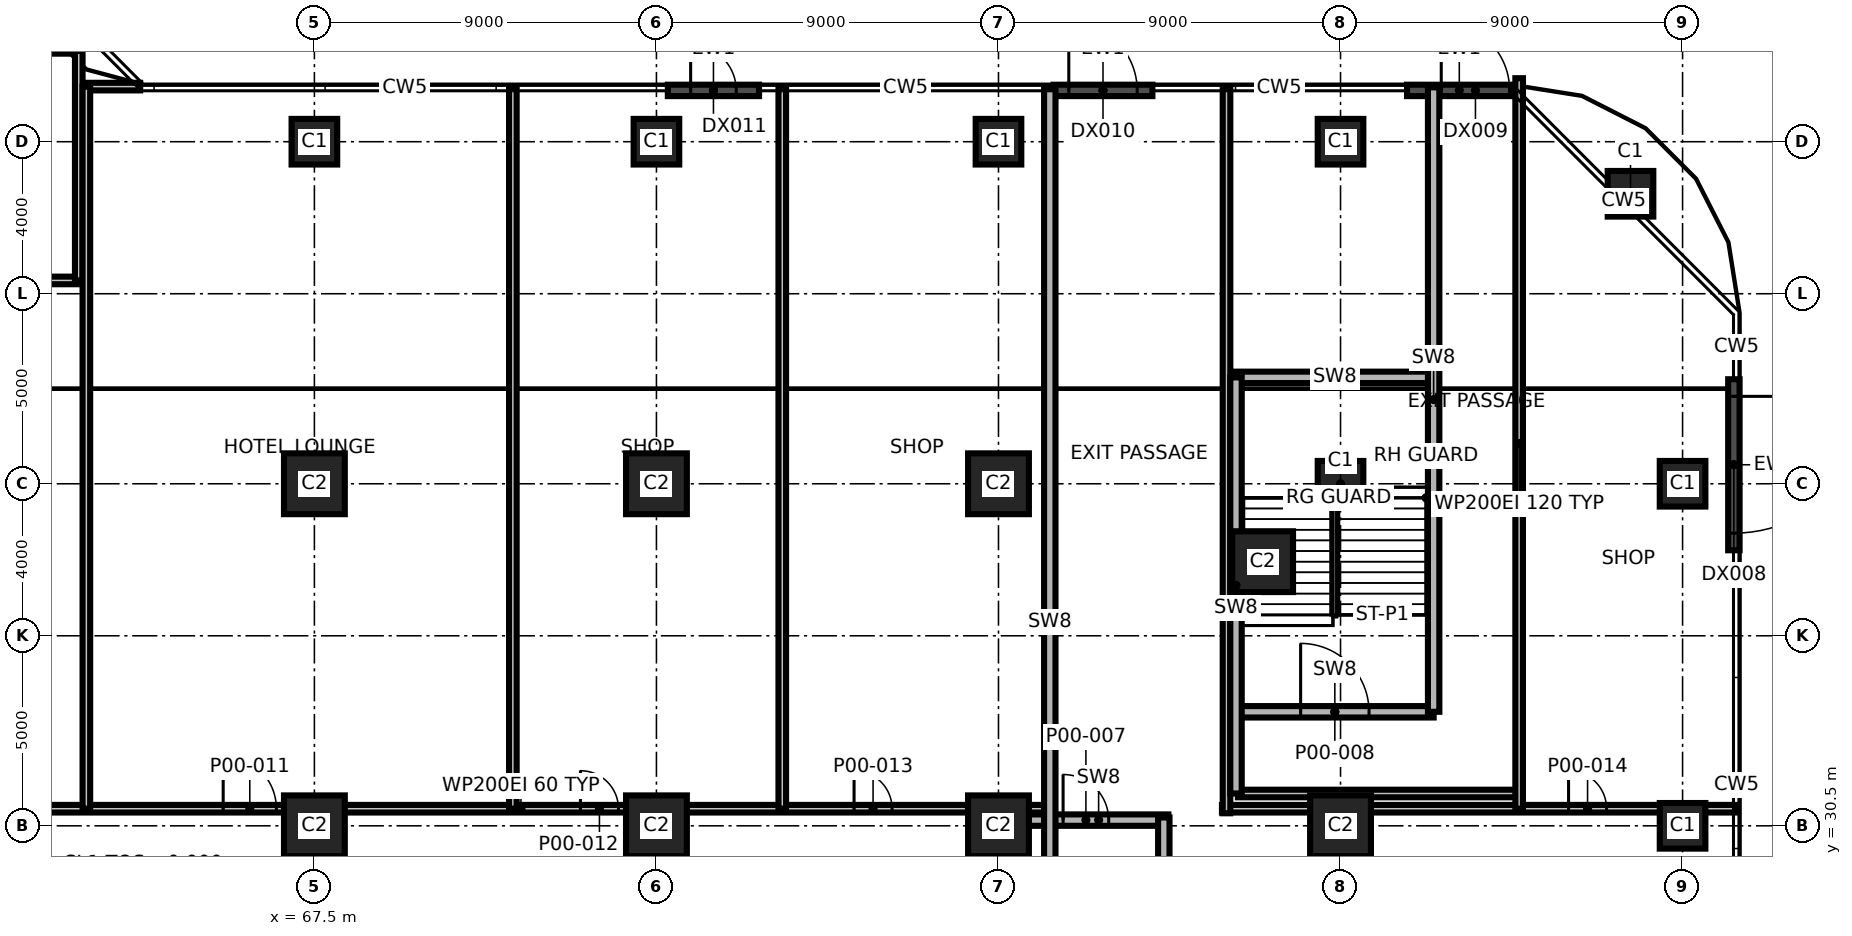
"""IFC4 building model, lengths in metres.
Left out: names, types, materials, properties, quantities, classifications, styles, units other than length and angle.
Written with IfcOpenShell. Run it as: python <this file> out.ifc"""

import sys

from ifc_helpers import new_model, si_unit, direction, frame, frame_2d, origin, origin_2d, place, context, subcontext, project, spatial, rectangle, extrude, element, fill, save


model = new_model("IFC4")
c1 = context("Model", 3, precision=1e-05, world=origin(), true_north=direction((0.0, 1.0)))
c2 = subcontext(c1, "Body", "Model", "MODEL_VIEW")
j1 = project(units=[si_unit("LENGTHUNIT", "METRE"), si_unit("PLANEANGLEUNIT", "RADIAN")], contexts=[c1])
p1 = place(None, origin())
s1 = spatial("IfcSite", under=j1, at=p1, CompositionType="ELEMENT")
p2 = place(p1, origin())
s2 = spatial("IfcBuilding", under=s1, at=p2, CompositionType="ELEMENT")
p3 = place(p2, origin())
s3 = spatial("IfcBuildingStorey", under=s2, at=p3, CompositionType="ELEMENT", Elevation=0.0)
for number, where, z_axis, x_axis in (
    (1, (67.5, 30.5, 0.0), (0.0, 0.0, 1.0), (1.0, 0.0, 0.0)),
    (2, (76.5, 30.5, 0.0), (0.0, 0.0, 1.0), (1.0, 0.0, 0.0)),
    (3, (85.5, 30.5, 0.0), (0.0, 0.0, 1.0), (1.0, 0.0, 0.0)),
    (4, (94.5, 30.5, 0.0), (0.0, 0.0, 1.0), (1.0, 0.0, 0.0)),
):
    element("IfcColumn", number, at=place(p3, frame(where, z_axis=z_axis, x_axis=x_axis)), inside=s3, PredefinedType="COLUMN", context=c2, shape_type="SweptSolid", body=[
        extrude(rectangle(XDim=1.6, YDim=1.6, at=origin_2d()), origin(), (0.0, 0.0, 1.0), 8.0),
    ])
p4 = place(p3, frame((103.5, 30.5, 0.0), z_axis=(0.0, 0.0, 1.0), x_axis=(1.0, 0.0, 0.0)))
e5 = element("IfcColumn", 5, at=p4, inside=s3, PredefinedType="COLUMN", context=c2, shape_type="SweptSolid", body=[
    extrude(rectangle(XDim=1.2, YDim=1.2, at=origin_2d()), origin(), (0.0, 0.0, 1.0), 8.0),
])
for number, where, z_axis, x_axis in (
    (6, (67.5, 39.5, 0.0), (0.0, 0.0, 1.0), (1.0, 0.0, 0.0)),
    (7, (76.5, 39.5, 0.0), (0.0, 0.0, 1.0), (1.0, 0.0, 0.0)),
    (8, (85.5, 39.5, 0.0), (0.0, 0.0, 1.0), (1.0, 0.0, 0.0)),
):
    element("IfcColumn", number, at=place(p3, frame(where, z_axis=z_axis, x_axis=x_axis)), inside=s3, PredefinedType="COLUMN", context=c2, shape_type="SweptSolid", body=[
        extrude(rectangle(XDim=1.6, YDim=1.6, at=origin_2d()), origin(), (0.0, 0.0, 1.0), 8.0),
    ])
for number, where, z_axis, x_axis in (
    (9, (94.5, 39.5, 0.0), (0.0, 0.0, 1.0), (1.0, 0.0, 0.0)),
    (10, (103.5, 39.5, 0.0), (0.0, 0.0, 1.0), (1.0, 0.0, 0.0)),
    (11, (102.13, 47.13, 0.0), (0.0, 0.0, 1.0), (1.0, 0.0, 0.0)),
    (12, (67.5, 48.5, 0.0), (0.0, 0.0, 1.0), (1.0, 0.0, 0.0)),
    (13, (76.5, 48.5, 0.0), (0.0, 0.0, 1.0), (1.0, 0.0, 0.0)),
    (14, (85.5, 48.5, 0.0), (0.0, 0.0, 1.0), (1.0, 0.0, 0.0)),
    (15, (94.5, 48.5, 0.0), (0.0, 0.0, 1.0), (1.0, 0.0, 0.0)),
):
    element("IfcColumn", number, at=place(p3, frame(where, z_axis=z_axis, x_axis=x_axis)), inside=s3, PredefinedType="COLUMN", context=c2, shape_type="SweptSolid", body=[
        extrude(rectangle(XDim=1.2, YDim=1.2, at=origin_2d()), origin(), (0.0, 0.0, 1.0), 8.0),
    ])
p5 = place(p3, frame((92.45, 37.45, 0.0), z_axis=(0.0, 0.0, 1.0), x_axis=(1.0, 0.0, 0.0)))
e16 = element("IfcColumn", 16, at=p5, inside=s3, PredefinedType="COLUMN", context=c2, shape_type="SweptSolid", body=[
    extrude(rectangle(XDim=1.6, YDim=1.6, at=origin_2d()), origin(), (0.0, 0.0, 1.0), 8.0),
])
p6 = place(p3, frame((104.85, 42.25, 0.0), z_axis=(0.0, 0.0, 1.0), x_axis=(0.0, -1.0, 0.0)))
e17 = element("IfcWall", 17, at=p6, inside=s3, PredefinedType="SOLIDWALL", context=c2, shape_type="SweptSolid", body=[
    extrude(rectangle(XDim=4.5, YDim=0.3, at=frame_2d((2.25, 0.0))), origin(), (0.0, 0.0, 1.0), 7.7),
])
p7 = place(p6, frame((0.45, 0.0, 0.0)))
e18 = element("IfcOpeningElement", 18, at=p7, cuts=e17, PredefinedType="OPENING", context=c2, shape_type="SweptSolid", body=[
    extrude(rectangle(XDim=3.6, YDim=3.0, at=frame_2d((1.8, 1.5))), frame((0.0, 0.16, 0.0), z_axis=(0.0, -1.0, 0.0), x_axis=(1.0, 0.0, 0.0)), (0.0, 0.0, 1.0), 0.32),
])
p8 = place(p3, frame((96.25, 49.85, 0.0), z_axis=(0.0, 0.0, 1.0), x_axis=(1.0, 0.0, 0.0)))
e19 = element("IfcWall", 19, at=p8, inside=s3, PredefinedType="SOLIDWALL", context=c2, shape_type="SweptSolid", body=[
    extrude(rectangle(XDim=2.75, YDim=0.3, at=frame_2d((1.375, 0.0))), origin(), (0.0, 0.0, 1.0), 7.7),
])
p9 = place(p8, frame((0.9, 0.0, 0.0)))
e20 = element("IfcOpeningElement", 20, at=p9, cuts=e19, PredefinedType="OPENING", context=c2, shape_type="SweptSolid", body=[
    extrude(rectangle(XDim=1.8, YDim=2.4, at=frame_2d((0.9, 1.2))), frame((0.0, 0.16, 0.0), z_axis=(0.0, -1.0, 0.0), x_axis=(1.0, 0.0, 0.0)), (0.0, 0.0, 1.0), 0.32),
])
p10 = place(p3, frame((86.95, 49.85, 0.0), z_axis=(0.0, 0.0, 1.0), x_axis=(1.0, 0.0, 0.0)))
e21 = element("IfcWall", 21, at=p10, inside=s3, PredefinedType="SOLIDWALL", context=c2, shape_type="SweptSolid", body=[
    extrude(rectangle(XDim=2.6, YDim=0.3, at=frame_2d((1.3, 0.0))), origin(), (0.0, 0.0, 1.0), 7.7),
])
p11 = place(p10, frame((0.4, 0.0, 0.0)))
e22 = element("IfcOpeningElement", 22, at=p11, cuts=e21, PredefinedType="OPENING", context=c2, shape_type="SweptSolid", body=[
    extrude(rectangle(XDim=1.8, YDim=2.4, at=frame_2d((0.9, 1.2))), frame((0.0, 0.16, 0.0), z_axis=(0.0, -1.0, 0.0), x_axis=(1.0, 0.0, 0.0)), (0.0, 0.0, 1.0), 0.32),
])
p12 = place(p3, frame((76.8, 49.85, 0.0), z_axis=(0.0, 0.0, 1.0), x_axis=(1.0, 0.0, 0.0)))
e23 = element("IfcWall", 23, at=p12, inside=s3, PredefinedType="SOLIDWALL", context=c2, shape_type="SweptSolid", body=[
    extrude(rectangle(XDim=2.4, YDim=0.3, at=frame_2d((1.2, 0.0))), origin(), (0.0, 0.0, 1.0), 7.7),
])
p13 = place(p12, frame((0.6, 0.0, 0.0)))
e24 = element("IfcOpeningElement", 24, at=p13, cuts=e23, PredefinedType="OPENING", context=c2, shape_type="SweptSolid", body=[
    extrude(rectangle(XDim=1.2, YDim=2.4, at=frame_2d((0.6, 1.2))), frame((0.0, 0.16, 0.0), z_axis=(0.0, -1.0, 0.0), x_axis=(1.0, 0.0, 0.0)), (0.0, 0.0, 1.0), 0.32),
])
p14 = place(p3, frame((86.3, 30.65, 0.0), z_axis=(0.0, 0.0, 1.0), x_axis=(1.0, 0.0, 0.0)))
e25 = element("IfcWall", 25, at=p14, inside=s3, PredefinedType="SHEAR", context=c2, shape_type="SweptSolid", body=[
    extrude(rectangle(XDim=3.67, YDim=0.3, at=frame_2d((1.835, 0.0))), origin(), (0.0, 0.0, 1.0), 7.7),
])
p15 = place(p14, frame((0.9, 0.0, 0.0)))
e26 = element("IfcOpeningElement", 26, at=p15, cuts=e25, PredefinedType="OPENING", context=c2, shape_type="SweptSolid", body=[
    extrude(rectangle(XDim=1.2, YDim=2.1, at=frame_2d((0.6, 1.05))), frame((0.0, 0.16, 0.0), z_axis=(0.0, -1.0, 0.0), x_axis=(1.0, 0.0, 0.0)), (0.0, 0.0, 1.0), 0.32),
])
p16 = place(p3, frame((58.97, 30.95, 0.0), z_axis=(0.0, 0.0, 1.0), x_axis=(1.0, 0.0, 0.0)))
e27 = element("IfcWall", 27, at=p16, inside=s3, PredefinedType="PARTITIONING", context=c2, shape_type="SweptSolid", body=[
    extrude(rectangle(XDim=27.93, YDim=0.2, at=frame_2d((13.965, 0.0))), origin(), (0.0, 0.0, 1.0), 7.7),
])
p17 = place(p16, frame((6.13, 0.0, 0.0)))
e28 = element("IfcOpeningElement", 28, at=p17, cuts=e27, PredefinedType="OPENING", context=c2, shape_type="SweptSolid", body=[
    extrude(rectangle(XDim=1.4, YDim=2.1, at=frame_2d((0.7, 1.05))), frame((0.0, 0.11, 0.0), z_axis=(0.0, -1.0, 0.0), x_axis=(1.0, 0.0, 0.0)), (0.0, 0.0, 1.0), 0.22),
])
p18 = place(p16, frame((15.53, 0.0, 0.0)))
e29 = element("IfcOpeningElement", 29, at=p18, cuts=e27, PredefinedType="OPENING", context=c2, shape_type="SweptSolid", body=[
    extrude(rectangle(XDim=1.0, YDim=2.1, at=frame_2d((0.5, 1.05))), frame((0.0, 0.11, 0.0), z_axis=(0.0, -1.0, 0.0), x_axis=(1.0, 0.0, 0.0)), (0.0, 0.0, 1.0), 0.22),
])
p19 = place(p16, frame((22.73, 0.0, 0.0)))
e30 = element("IfcOpeningElement", 30, at=p19, cuts=e27, PredefinedType="OPENING", context=c2, shape_type="SweptSolid", body=[
    extrude(rectangle(XDim=1.0, YDim=2.1, at=frame_2d((0.5, 1.05))), frame((0.0, 0.11, 0.0), z_axis=(0.0, -1.0, 0.0), x_axis=(1.0, 0.0, 0.0)), (0.0, 0.0, 1.0), 0.22),
])
p20 = place(p3, frame((91.38, 30.95, 0.0), z_axis=(0.0, 0.0, 1.0), x_axis=(1.0, 0.0, 0.0)))
e31 = element("IfcWall", 31, at=p20, inside=s3, PredefinedType="PARTITIONING", context=c2, shape_type="SweptSolid", body=[
    extrude(rectangle(XDim=13.55, YDim=0.2, at=frame_2d((6.775, 0.0))), origin(), (0.0, 0.0, 1.0), 6.8),
])
p21 = place(p20, frame((9.12, 0.0, 0.0)))
e32 = element("IfcOpeningElement", 32, at=p21, cuts=e31, PredefinedType="OPENING", context=c2, shape_type="SweptSolid", body=[
    extrude(rectangle(XDim=1.0, YDim=2.1, at=frame_2d((0.5, 1.05))), frame((0.0, 0.11, 0.0), z_axis=(0.0, -1.0, 0.0), x_axis=(1.0, 0.0, 0.0)), (0.0, 0.0, 1.0), 0.22),
])
p22 = place(p3, frame((91.8, 31.35, 0.0), z_axis=(0.0, 0.0, 1.0), x_axis=(1.0, 0.0, 0.0)))
e33 = element("IfcWall", 33, at=p22, inside=s3, PredefinedType="PARTITIONING", context=c2, shape_type="SweptSolid", body=[
    extrude(rectangle(XDim=7.4, YDim=0.2, at=frame_2d((3.7, 0.0))), origin(), (0.0, 0.0, 1.0), 7.7),
])
p23 = place(p3, frame((91.75, 33.5, 0.0), z_axis=(0.0, 0.0, 1.0), x_axis=(1.0, 0.0, 0.0)))
e34 = element("IfcWall", 34, at=p23, inside=s3, PredefinedType="SHEAR", context=c2, shape_type="SweptSolid", body=[
    extrude(rectangle(XDim=5.2, YDim=0.3, at=frame_2d((2.6, 0.0))), origin(), (0.0, 0.0, 1.0), 7.7),
])
p24 = place(p23, frame((1.7, 0.0, 0.0)))
e35 = element("IfcOpeningElement", 35, at=p24, cuts=e34, PredefinedType="OPENING", context=c2, shape_type="SweptSolid", body=[
    extrude(rectangle(XDim=1.8, YDim=2.1, at=frame_2d((0.9, 1.05))), frame((0.0, 0.16, 0.0), z_axis=(0.0, -1.0, 0.0), x_axis=(1.0, 0.0, 0.0)), (0.0, 0.0, 1.0), 0.32),
])
p25 = place(p3, frame((91.75, 42.3, 0.0), z_axis=(0.0, 0.0, 1.0), x_axis=(1.0, 0.0, 0.0)))
e36 = element("IfcWall", 36, at=p25, inside=s3, PredefinedType="SHEAR", context=c2, shape_type="SweptSolid", body=[
    extrude(rectangle(XDim=5.2, YDim=0.3, at=frame_2d((2.6, 0.0))), origin(), (0.0, 0.0, 1.0), 7.7),
])
p26 = place(p3, frame((43.3, 44.85, 0.0), z_axis=(0.0, 0.0, 1.0), x_axis=(1.0, 0.0, 0.0)))
e37 = element("IfcWall", 37, at=p26, inside=s3, PredefinedType="PARTITIONING", context=c2, shape_type="SweptSolid", body=[
    extrude(rectangle(XDim=18.2, YDim=0.2, at=frame_2d((9.1, 0.0))), origin(), (0.0, 0.0, 1.0), 7.7),
])
p27 = place(p26, frame((5.589, 0.0, 0.0)))
e38 = element("IfcOpeningElement", 38, at=p27, cuts=e37, PredefinedType="OPENING", context=c2, shape_type="SweptSolid", body=[
    extrude(rectangle(XDim=1.0, YDim=2.1, at=frame_2d((0.5, 1.05))), frame((0.0, 0.11, 0.0), z_axis=(0.0, -1.0, 0.0), x_axis=(1.0, 0.0, 0.0)), (0.0, 0.0, 1.0), 0.22),
])
p28 = place(p3, frame((61.5, 49.95, 0.0), z_axis=(0.0, 0.0, 1.0), x_axis=(1.0, 0.0, 0.0)))
e39 = element("IfcWall", 39, at=p28, inside=s3, PredefinedType="PARTITIONING", context=c2, shape_type="SweptSolid", body=[
    extrude(rectangle(XDim=1.416, YDim=0.2, at=frame_2d((0.708, 0.0))), origin(), (0.0, 0.0, 1.0), 6.8),
])
p29 = place(p3, frame((43.3, 50.917, 0.0), z_axis=(0.0, 0.0, 1.0), x_axis=(1.0, 0.0, 0.0)))
e40 = element("IfcWall", 40, at=p29, inside=s3, PredefinedType="PARTITIONING", context=c2, shape_type="SweptSolid", body=[
    extrude(rectangle(XDim=17.972, YDim=0.2, at=frame_2d((8.986, 0.0))), origin(), (0.0, 0.0, 1.0), 6.8),
])
p30 = place(p3, frame((61.3, 44.85, 0.0), z_axis=(0.0, 0.0, 1.0), x_axis=(0.0, 1.0, 0.0)))
e41 = element("IfcWall", 41, at=p30, inside=s3, PredefinedType="PARTITIONING", context=c2, shape_type="SweptSolid", body=[
    extrude(rectangle(XDim=6.038, YDim=0.2, at=frame_2d((3.019, 0.0))), origin(), (0.0, 0.0, 1.0), 6.8),
])
p31 = place(p3, frame((61.5, 30.95, 0.0), z_axis=(0.0, 0.0, 1.0), x_axis=(0.0, 1.0, 0.0)))
e42 = element("IfcWall", 42, at=p31, inside=s3, PredefinedType="PARTITIONING", context=c2, shape_type="SweptSolid", body=[
    extrude(rectangle(XDim=19.0, YDim=0.2, at=frame_2d((9.5, 0.0))), origin(), (0.0, 0.0, 1.0), 6.8),
])
for number, where, z_axis, x_axis in (
    (43, (72.722, 30.95, 0.0), (0.0, 0.0, 1.0), (0.0, 1.0, 0.0)),
    (44, (79.811, 30.95, 0.0), (0.0, 0.0, 1.0), (0.0, 1.0, 0.0)),
):
    element("IfcWall", number, at=place(p3, frame(where, z_axis=z_axis, x_axis=x_axis)), inside=s3, PredefinedType="PARTITIONING", context=c2, shape_type="SweptSolid", body=[
        extrude(rectangle(XDim=18.98, YDim=0.2, at=frame_2d((9.49, 0.0))), origin(), (0.0, 0.0, 1.0), 6.8),
    ])
p32 = place(p3, frame((86.85, 21.8, 0.0), z_axis=(0.0, 0.0, 1.0), x_axis=(0.0, 1.0, 0.0)))
e45 = element("IfcWall", 45, at=p32, inside=s3, PredefinedType="SHEAR", context=c2, shape_type="SweptSolid", body=[
    extrude(rectangle(XDim=28.13, YDim=0.3, at=frame_2d((14.065, 0.0))), origin(), (0.0, 0.0, 1.0), 7.7),
])
p33 = place(p3, frame((89.85, 21.8, 0.0), z_axis=(0.0, 0.0, 1.0), x_axis=(0.0, 1.0, 0.0)))
e46 = element("IfcWall", 46, at=p33, inside=s3, PredefinedType="SHEAR", context=c2, shape_type="SweptSolid", body=[
    extrude(rectangle(XDim=8.92, YDim=0.3, at=frame_2d((4.46, 0.0))), origin(), (0.0, 0.0, 1.0), 7.7),
])
p34 = place(p3, frame((91.5, 30.83, 0.0), z_axis=(0.0, 0.0, 1.0), x_axis=(0.0, 1.0, 0.0)))
e47 = element("IfcWall", 47, at=p34, inside=s3, PredefinedType="PARTITIONING", context=c2, shape_type="SweptSolid", body=[
    extrude(rectangle(XDim=19.1, YDim=0.2, at=frame_2d((9.55, 0.0))), origin(), (0.0, 0.0, 1.0), 6.8),
])
p35 = place(p3, frame((91.75, 31.35, 0.0), z_axis=(0.0, 0.0, 1.0), x_axis=(0.0, 1.0, 0.0)))
e48 = element("IfcWall", 48, at=p35, inside=s3, PredefinedType="SHEAR", context=c2, shape_type="SweptSolid", body=[
    extrude(rectangle(XDim=10.95, YDim=0.3, at=frame_2d((5.475, 0.0))), origin(), (0.0, 0.0, 1.0), 7.7),
])
p36 = place(p3, frame((96.95, 33.5, 0.0), z_axis=(0.0, 0.0, 1.0), x_axis=(0.0, 1.0, 0.0)))
e49 = element("IfcWall", 49, at=p36, inside=s3, PredefinedType="SHEAR", context=c2, shape_type="SweptSolid", body=[
    extrude(rectangle(XDim=16.43, YDim=0.3, at=frame_2d((8.215, 0.0))), origin(), (0.0, 0.0, 1.0), 7.7),
])
p37 = place(p3, frame((99.2, 30.95, 0.0), z_axis=(0.0, 0.0, 1.0), x_axis=(0.0, 1.0, 0.0)))
e50 = element("IfcWall", 50, at=p37, inside=s3, PredefinedType="PARTITIONING", context=c2, shape_type="SweptSolid", body=[
    extrude(rectangle(XDim=19.221, YDim=0.2, at=frame_2d((9.61, 0.0))), origin(), (0.0, 0.0, 1.0), 6.8),
])
p38 = place(p7, origin())
e51 = element("IfcDoor", 51, at=p38, inside=s3, OperationType="SINGLE_SWING_LEFT", PredefinedType="DOOR", context=c2, shape_type="SweptSolid", body=[
    extrude(rectangle(XDim=3.6, YDim=3.0, at=frame_2d((1.8, 1.5))), frame((0.0, 0.025, 0.0), z_axis=(0.0, -1.0, 0.0), x_axis=(1.0, 0.0, 0.0)), (0.0, 0.0, 1.0), 0.05),
])
fill(e18, e51)
p39 = place(p9, origin())
e52 = element("IfcDoor", 52, at=p39, inside=s3, OperationType="SINGLE_SWING_LEFT", PredefinedType="DOOR", context=c2, shape_type="SweptSolid", body=[
    extrude(rectangle(XDim=1.8, YDim=2.4, at=frame_2d((0.9, 1.2))), frame((0.0, 0.025, 0.0), z_axis=(0.0, -1.0, 0.0), x_axis=(1.0, 0.0, 0.0)), (0.0, 0.0, 1.0), 0.05),
])
fill(e20, e52)
p40 = place(p11, origin())
e53 = element("IfcDoor", 53, at=p40, inside=s3, OperationType="SINGLE_SWING_LEFT", PredefinedType="DOOR", context=c2, shape_type="SweptSolid", body=[
    extrude(rectangle(XDim=1.8, YDim=2.4, at=frame_2d((0.9, 1.2))), frame((0.0, 0.025, 0.0), z_axis=(0.0, -1.0, 0.0), x_axis=(1.0, 0.0, 0.0)), (0.0, 0.0, 1.0), 0.05),
])
fill(e22, e53)
p41 = place(p13, origin())
e54 = element("IfcDoor", 54, at=p41, inside=s3, OperationType="SINGLE_SWING_LEFT", PredefinedType="DOOR", context=c2, shape_type="SweptSolid", body=[
    extrude(rectangle(XDim=1.2, YDim=2.4, at=frame_2d((0.6, 1.2))), frame((0.0, 0.025, 0.0), z_axis=(0.0, -1.0, 0.0), x_axis=(1.0, 0.0, 0.0)), (0.0, 0.0, 1.0), 0.05),
])
fill(e24, e54)
p42 = place(p15, origin())
e55 = element("IfcDoor", 55, at=p42, inside=s3, OperationType="SINGLE_SWING_LEFT", PredefinedType="DOOR", context=c2, shape_type="SweptSolid", body=[
    extrude(rectangle(XDim=1.2, YDim=2.1, at=frame_2d((0.6, 1.05))), frame((0.0, 0.025, 0.0), z_axis=(0.0, -1.0, 0.0), x_axis=(1.0, 0.0, 0.0)), (0.0, 0.0, 1.0), 0.05),
])
fill(e26, e55)
p43 = place(p24, origin())
e56 = element("IfcDoor", 56, at=p43, inside=s3, OperationType="SINGLE_SWING_RIGHT", PredefinedType="DOOR", context=c2, shape_type="SweptSolid", body=[
    extrude(rectangle(XDim=1.8, YDim=2.1, at=frame_2d((0.9, 1.05))), frame((0.0, 0.025, 0.0), z_axis=(0.0, -1.0, 0.0), x_axis=(1.0, 0.0, 0.0)), (0.0, 0.0, 1.0), 0.05),
])
fill(e35, e56)
p44 = place(p17, origin())
e57 = element("IfcDoor", 57, at=p44, inside=s3, OperationType="SINGLE_SWING_LEFT", PredefinedType="DOOR", context=c2, shape_type="SweptSolid", body=[
    extrude(rectangle(XDim=1.4, YDim=2.1, at=frame_2d((0.7, 1.05))), frame((0.0, 0.025, 0.0), z_axis=(0.0, -1.0, 0.0), x_axis=(1.0, 0.0, 0.0)), (0.0, 0.0, 1.0), 0.05),
])
fill(e28, e57)
p45 = place(p18, origin())
e58 = element("IfcDoor", 58, at=p45, inside=s3, OperationType="SINGLE_SWING_RIGHT", PredefinedType="DOOR", context=c2, shape_type="SweptSolid", body=[
    extrude(rectangle(XDim=1.0, YDim=2.1, at=frame_2d((0.5, 1.05))), frame((0.0, 0.025, 0.0), z_axis=(0.0, -1.0, 0.0), x_axis=(1.0, 0.0, 0.0)), (0.0, 0.0, 1.0), 0.05),
])
fill(e29, e58)
p46 = place(p19, origin())
e59 = element("IfcDoor", 59, at=p46, inside=s3, OperationType="SINGLE_SWING_LEFT", PredefinedType="DOOR", context=c2, shape_type="SweptSolid", body=[
    extrude(rectangle(XDim=1.0, YDim=2.1, at=frame_2d((0.5, 1.05))), frame((0.0, 0.025, 0.0), z_axis=(0.0, -1.0, 0.0), x_axis=(1.0, 0.0, 0.0)), (0.0, 0.0, 1.0), 0.05),
])
fill(e30, e59)
p47 = place(p21, origin())
e60 = element("IfcDoor", 60, at=p47, inside=s3, OperationType="SINGLE_SWING_RIGHT", PredefinedType="DOOR", context=c2, shape_type="SweptSolid", body=[
    extrude(rectangle(XDim=1.0, YDim=2.1, at=frame_2d((0.5, 1.05))), frame((0.0, 0.025, 0.0), z_axis=(0.0, -1.0, 0.0), x_axis=(1.0, 0.0, 0.0)), (0.0, 0.0, 1.0), 0.05),
])
fill(e32, e60)
save(model, sys.argv[1])
